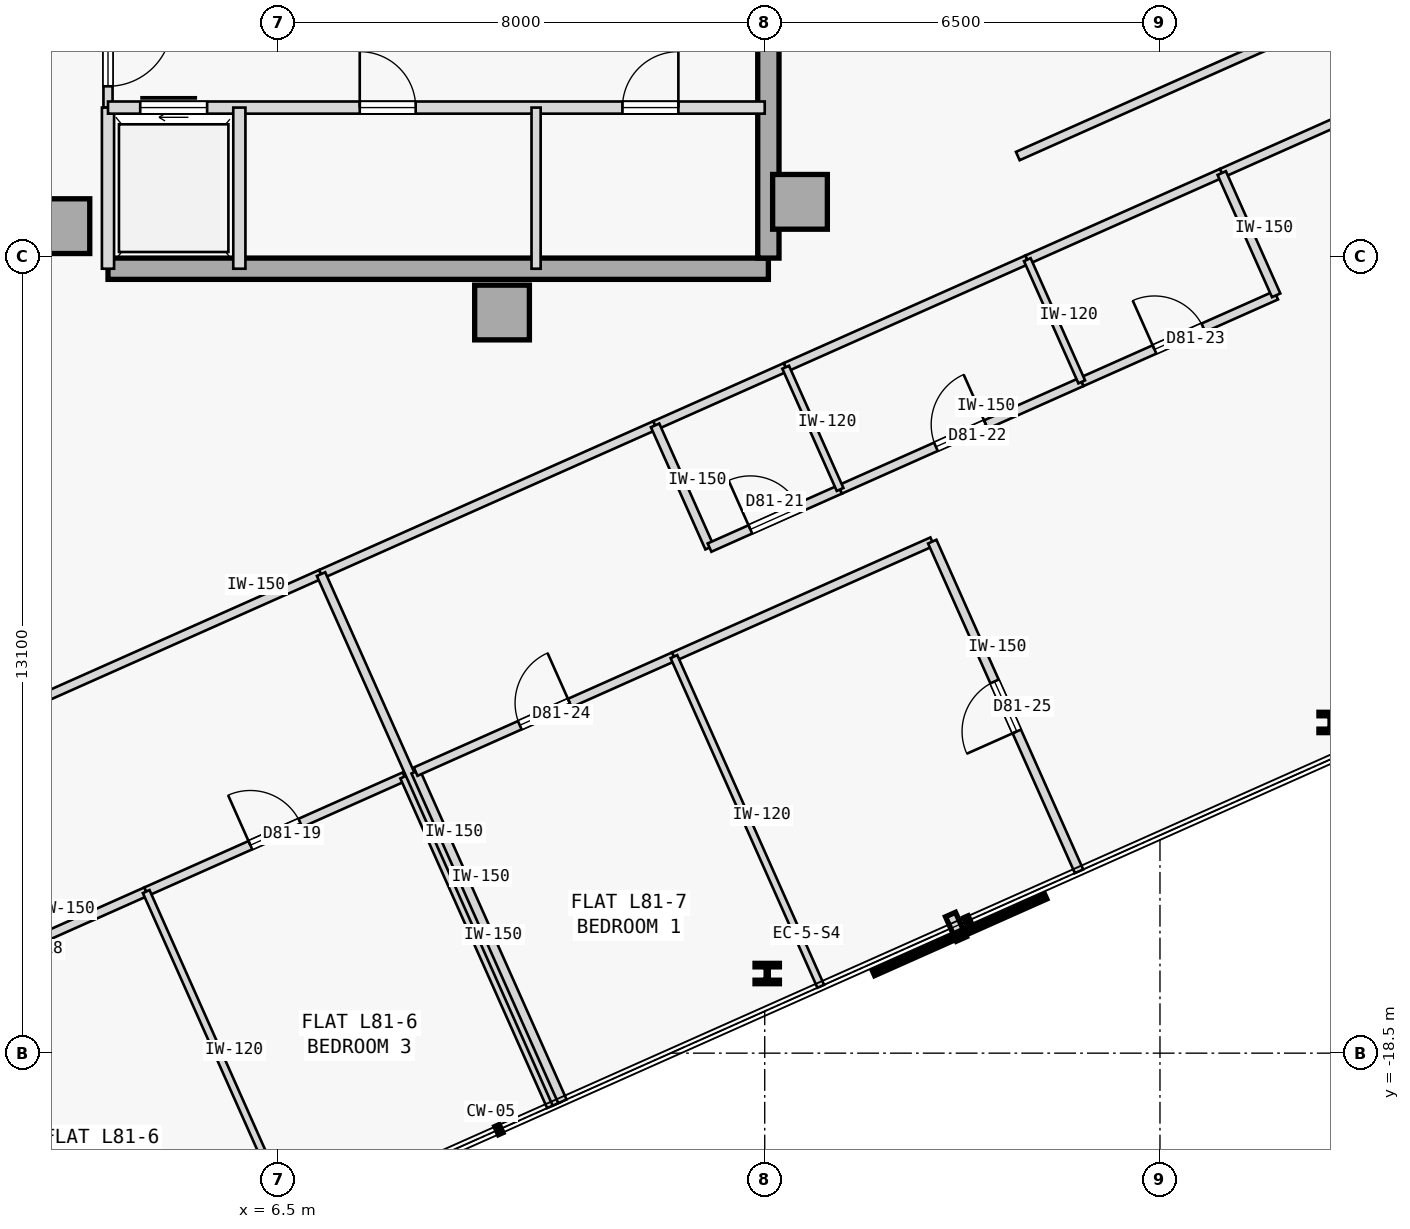
"""IFC4 building model, lengths in metres.
Left out: names, types, materials, properties, quantities, classifications, styles, units other than length and angle.
Written with IfcOpenShell. Run it as: python <this file> out.ifc"""

import sys

from ifc_helpers import new_model, si_unit, direction, frame, frame_2d, origin, origin_2d, place, context, subcontext, project, spatial, rectangle, i_section, extrude, element, fill, save


model = new_model("IFC4")
c1 = context("Model", 3, precision=1e-05, world=origin(), true_north=direction((0.0, 1.0)))
c2 = subcontext(c1, "Body", "Model", "MODEL_VIEW")
j1 = project(units=[si_unit("LENGTHUNIT", "METRE"), si_unit("PLANEANGLEUNIT", "RADIAN")], contexts=[c1])
p1 = place(None, origin())
s1 = spatial("IfcSite", under=j1, at=p1, CompositionType="ELEMENT")
p2 = place(p1, origin())
s2 = spatial("IfcBuilding", under=s1, at=p2, CompositionType="ELEMENT")
p3 = place(p2, frame((0.0, 0.0, 302.0)))
s3 = spatial("IfcBuildingStorey", under=s2, at=p3, CompositionType="ELEMENT", Elevation=302.0)
for number, where, z_axis, x_axis in (
    (1, (15.08, -4.5, 0.0), (0.0, 0.0, 1.0), (1.0, 0.0, 0.0)),
    (2, (10.18, -6.32, 0.0), (0.0, 0.0, 1.0), (1.0, 0.0, 0.0)),
    (3, (2.95, -4.9, 0.0), (0.0, 0.0, 1.0), (1.0, 0.0, 0.0)),
):
    element("IfcColumn", number, at=place(p3, frame(where, z_axis=z_axis, x_axis=x_axis)), inside=s3, PredefinedType="COLUMN", context=c2, shape_type="SweptSolid", body=[
        extrude(rectangle(XDim=0.9, YDim=0.9, at=origin_2d()), origin(), (0.0, 0.0, 1.0), 3.55),
    ])
p4 = place(p3, frame((3.7, -5.6, 0.0), z_axis=(0.0, 0.0, 1.0), x_axis=(1.0, 0.0, 0.0)))
e4 = element("IfcWall", 4, at=p4, inside=s3, PredefinedType="SHEAR", context=c2, shape_type="SweptSolid", body=[
    extrude(rectangle(XDim=10.86, YDim=0.35, at=frame_2d((5.43, 0.0))), origin(), (0.0, 0.0, 1.0), 3.145),
])
p5 = place(p3, frame((14.56, -5.425, 0.0), z_axis=(0.0, 0.0, 1.0), x_axis=(0.0, 1.0, 0.0)))
e5 = element("IfcWall", 5, at=p5, inside=s3, PredefinedType="SHEAR", context=c2, shape_type="SweptSolid", body=[
    extrude(rectangle(XDim=10.85, YDim=0.35, at=frame_2d((5.425, 0.0))), origin(), (0.0, 0.0, 1.0), 3.145),
])
for number, where, z_axis, x_axis in (
    (6, (14.541, -17.19, 0.0), (0.0, 0.0, 1.0), (1.0, 0.0, 0.0)),
    (7, (23.814, -13.062, 0.0), (0.0, 0.0, 1.0), (1.0, 0.0, 0.0)),
):
    element("IfcColumn", number, at=place(p3, frame(where, z_axis=z_axis, x_axis=x_axis)), inside=s3, PredefinedType="COLUMN", context=c2, shape_type="SweptSolid", body=[
        extrude(i_section(OverallWidth=0.401, OverallDepth=0.335, WebThickness=0.036, FlangeThickness=0.058, FilletRadius=0.015, at=origin_2d()), origin(), (0.0, 0.0, 1.0), 3.55),
    ])
p6 = place(p3, frame((3.7, -2.95, 0.0), z_axis=(0.0, 0.0, 1.0), x_axis=(0.0, 1.0, 0.0)))
e8 = element("IfcWall", 8, at=p6, inside=s3, PredefinedType="PARTITIONING", context=c2, shape_type="SweptSolid", body=[
    extrude(rectangle(XDim=1.8, YDim=0.15, at=frame_2d((0.9, 0.0))), origin(), (0.0, 0.0, 1.0), 3.145),
])
p7 = place(p6, frame((0.35, 0.0, 0.0)))
e9 = element("IfcOpeningElement", 9, at=p7, cuts=e8, PredefinedType="OPENING", context=c2, shape_type="SweptSolid", body=[
    extrude(rectangle(XDim=1.05, YDim=2.18, at=frame_2d((0.525, 1.09))), frame((0.0, 0.085, 0.0), z_axis=(0.0, -1.0, 0.0), x_axis=(1.0, 0.0, 0.0)), (0.0, 0.0, 1.0), 0.17),
])
p8 = place(p3, frame((3.7, -5.6, 0.0), z_axis=(0.0, 0.0, 1.0), x_axis=(0.0, 1.0, 0.0)))
e10 = element("IfcWall", 10, at=p8, inside=s3, PredefinedType="STANDARD", context=c2, shape_type="SweptSolid", body=[
    extrude(rectangle(XDim=2.65, YDim=0.2, at=frame_2d((1.325, 0.0))), origin(), (0.0, 0.0, 1.0), 3.145),
])
p9 = place(p3, frame((3.7, -2.95, 0.0), z_axis=(0.0, 0.0, 1.0), x_axis=(1.0, 0.0, 0.0)))
e11 = element("IfcWall", 11, at=p9, inside=s3, PredefinedType="STANDARD", context=c2, shape_type="SweptSolid", body=[
    extrude(rectangle(XDim=10.8, YDim=0.2, at=frame_2d((5.4, 0.0))), origin(), (0.0, 0.0, 1.0), 3.145),
])
p10 = place(p9, frame((0.53, 0.0, 0.0)))
e12 = element("IfcOpeningElement", 12, at=p10, cuts=e11, PredefinedType="OPENING", context=c2, shape_type="SweptSolid", body=[
    extrude(rectangle(XDim=1.1, YDim=2.15, at=frame_2d((0.55, 1.075))), frame((0.0, 0.11, 0.0), z_axis=(0.0, -1.0, 0.0), x_axis=(1.0, 0.0, 0.0)), (0.0, 0.0, 1.0), 0.22),
])
p11 = place(p9, frame((4.14, 0.0, 0.0)))
e13 = element("IfcOpeningElement", 13, at=p11, cuts=e11, PredefinedType="OPENING", context=c2, shape_type="SweptSolid", body=[
    extrude(rectangle(XDim=0.92, YDim=2.04, at=frame_2d((0.46, 1.02))), frame((0.0, 0.11, 0.0), z_axis=(0.0, -1.0, 0.0), x_axis=(1.0, 0.0, 0.0)), (0.0, 0.0, 1.0), 0.22),
])
p12 = place(p9, frame((8.46, 0.0, 0.0)))
e14 = element("IfcOpeningElement", 14, at=p12, cuts=e11, PredefinedType="OPENING", context=c2, shape_type="SweptSolid", body=[
    extrude(rectangle(XDim=0.92, YDim=2.04, at=frame_2d((0.46, 1.02))), frame((0.0, 0.11, 0.0), z_axis=(0.0, -1.0, 0.0), x_axis=(1.0, 0.0, 0.0)), (0.0, 0.0, 1.0), 0.22),
])
p13 = place(p3, frame((5.86, -5.6, 0.0), z_axis=(0.0, 0.0, 1.0), x_axis=(0.0, 1.0, 0.0)))
e15 = element("IfcWall", 15, at=p13, inside=s3, PredefinedType="STANDARD", context=c2, shape_type="SweptSolid", body=[
    extrude(rectangle(XDim=2.65, YDim=0.2, at=frame_2d((1.325, 0.0))), origin(), (0.0, 0.0, 1.0), 3.145),
])
p14 = place(p3, frame((10.74, -5.6, 0.0), z_axis=(0.0, 0.0, 1.0), x_axis=(0.0, 1.0, 0.0)))
e16 = element("IfcWall", 16, at=p14, inside=s3, PredefinedType="PARTITIONING", context=c2, shape_type="SweptSolid", body=[
    extrude(rectangle(XDim=2.65, YDim=0.15, at=frame_2d((1.325, 0.0))), origin(), (0.0, 0.0, 1.0), 3.145),
])
p15 = place(p3, frame((-4.445, -15.808, 0.0), z_axis=(0.0, 0.0, 1.0), x_axis=(0.913546853922, 0.406733506966, 0.0)))
e17 = element("IfcWall", 17, at=p15, inside=s3, PredefinedType="PARTITIONING", context=c2, shape_type="SweptSolid", body=[
    extrude(rectangle(XDim=12.751, YDim=0.15, at=frame_2d((6.375, 0.0))), origin(), (0.0, 0.0, 1.0), 3.145),
])
p16 = place(p3, frame((7.204, -10.622, 0.0), z_axis=(0.0, 0.0, 1.0), x_axis=(0.913545172627, 0.406737283231, 0.0)))
e18 = element("IfcWall", 18, at=p16, inside=s3, PredefinedType="PARTITIONING", context=c2, shape_type="SweptSolid", body=[
    extrude(rectangle(XDim=6.014, YDim=0.15, at=frame_2d((3.007, 0.0))), origin(), (0.0, 0.0, 1.0), 3.145),
])
p17 = place(p3, frame((22.016, -4.027, 0.0), z_axis=(0.0, 0.0, 1.0), x_axis=(0.913548968583, 0.406728757282, 0.0)))
e19 = element("IfcWall", 19, at=p17, inside=s3, PredefinedType="PARTITIONING", context=c2, shape_type="SweptSolid", body=[
    extrude(rectangle(XDim=11.242, YDim=0.15, at=frame_2d((5.621, 0.0))), origin(), (0.0, 0.0, 1.0), 3.145),
])
p18 = place(p17, frame((5.146, 0.0, 0.0)))
e20 = element("IfcOpeningElement", 20, at=p18, cuts=e19, PredefinedType="OPENING", context=c2, shape_type="SweptSolid", body=[
    extrude(rectangle(XDim=0.95, YDim=2.04, at=frame_2d((0.475, 1.02))), frame((0.0, 0.085, 0.0), z_axis=(0.0, -1.0, 0.0), x_axis=(1.0, 0.0, 0.0)), (0.0, 0.0, 1.0), 0.17),
])
p19 = place(p3, frame((12.698, -8.176, 0.0), z_axis=(0.0, 0.0, 1.0), x_axis=(0.913558622212, 0.406707073682, 0.0)))
e21 = element("IfcWall", 21, at=p19, inside=s3, PredefinedType="PARTITIONING", context=c2, shape_type="SweptSolid", body=[
    extrude(rectangle(XDim=2.35, YDim=0.15, at=frame_2d((1.175, 0.0))), origin(), (0.0, 0.0, 1.0), 3.145),
])
p20 = place(p3, frame((14.844, -7.22, 0.0), z_axis=(0.0, 0.0, 1.0), x_axis=(0.913524337797, 0.406784075711, 0.0)))
e22 = element("IfcWall", 22, at=p20, inside=s3, PredefinedType="PARTITIONING", context=c2, shape_type="SweptSolid", body=[
    extrude(rectangle(XDim=4.35, YDim=0.15, at=frame_2d((2.175, 0.0))), origin(), (0.0, 0.0, 1.0), 3.145),
])
p21 = place(p3, frame((18.818, -5.451, 0.0), z_axis=(0.0, 0.0, 1.0), x_axis=(0.913538066796, 0.406753242783, 0.0)))
e23 = element("IfcWall", 23, at=p21, inside=s3, PredefinedType="PARTITIONING", context=c2, shape_type="SweptSolid", body=[
    extrude(rectangle(XDim=3.5, YDim=0.15, at=frame_2d((1.75, 0.0))), origin(), (0.0, 0.0, 1.0), 3.145),
])
p22 = place(p3, frame((18.662, -3.747, 0.0), z_axis=(0.0, 0.0, 1.0), x_axis=(0.913544622417, 0.406738519018, 0.0)))
e24 = element("IfcWall", 24, at=p22, inside=s3, PredefinedType="PARTITIONING", context=c2, shape_type="SweptSolid", body=[
    extrude(rectangle(XDim=14.192, YDim=0.15, at=frame_2d((7.096, 0.0))), origin(), (0.0, 0.0, 1.0), 3.145),
])
p23 = place(p22, frame((6.636, 0.0, 0.0)))
e25 = element("IfcOpeningElement", 25, at=p23, cuts=e24, PredefinedType="OPENING", context=c2, shape_type="SweptSolid", body=[
    extrude(rectangle(XDim=0.92, YDim=2.04, at=frame_2d((0.46, 1.02))), frame((0.0, 0.085, 0.0), z_axis=(0.0, -1.0, 0.0), x_axis=(1.0, 0.0, 0.0)), (0.0, 0.0, 1.0), 0.17),
])
p24 = place(p3, frame((0.08, -17.734, 0.0), z_axis=(0.0, 0.0, 1.0), x_axis=(0.91354505039, 0.40673755778, 0.0)))
e26 = element("IfcWall", 26, at=p24, inside=s3, PredefinedType="PARTITIONING", context=c2, shape_type="SweptSolid", body=[
    extrude(rectangle(XDim=4.65, YDim=0.15, at=frame_2d((2.325, 0.0))), origin(), (0.0, 0.0, 1.0), 3.145),
])
p25 = place(p24, frame((1.875, 0.0, 0.0)))
e27 = element("IfcOpeningElement", 27, at=p25, cuts=e26, PredefinedType="OPENING", context=c2, shape_type="SweptSolid", body=[
    extrude(rectangle(XDim=0.9, YDim=2.04, at=frame_2d((0.45, 1.02))), frame((0.0, 0.085, 0.0), z_axis=(0.0, -1.0, 0.0), x_axis=(1.0, 0.0, 0.0)), (0.0, 0.0, 1.0), 0.17),
])
p26 = place(p3, frame((4.328, -15.843, 0.0), z_axis=(0.0, 0.0, 1.0), x_axis=(0.91354505039, 0.40673755778, 0.0)))
e28 = element("IfcWall", 28, at=p26, inside=s3, PredefinedType="PARTITIONING", context=c2, shape_type="SweptSolid", body=[
    extrude(rectangle(XDim=4.65, YDim=0.15, at=frame_2d((2.325, 0.0))), origin(), (0.0, 0.0, 1.0), 3.145),
])
p27 = place(p26, frame((1.875, 0.0, 0.0)))
e29 = element("IfcOpeningElement", 29, at=p27, cuts=e28, PredefinedType="OPENING", context=c2, shape_type="SweptSolid", body=[
    extrude(rectangle(XDim=0.9, YDim=2.04, at=frame_2d((0.45, 1.02))), frame((0.0, 0.085, 0.0), z_axis=(0.0, -1.0, 0.0), x_axis=(1.0, 0.0, 0.0)), (0.0, 0.0, 1.0), 0.17),
])
p28 = place(p3, frame((10.99, -19.373, 0.0), z_axis=(0.0, 0.0, 1.0), x_axis=(-0.406749048544, 0.913539934271, 0.0)))
e30 = element("IfcWall", 30, at=p28, inside=s3, PredefinedType="PARTITIONING", context=c2, shape_type="SweptSolid", body=[
    extrude(rectangle(XDim=5.935, YDim=0.15, at=frame_2d((2.968, 0.0))), origin(), (0.0, 0.0, 1.0), 3.145),
])
p29 = place(p3, frame((11.082, -19.333, 0.0), z_axis=(0.0, 0.0, 1.0), x_axis=(-0.406729927653, 0.913548447512, 0.0)))
e31 = element("IfcWall", 31, at=p29, inside=s3, PredefinedType="PARTITIONING", context=c2, shape_type="SweptSolid", body=[
    extrude(rectangle(XDim=9.535, YDim=0.15, at=frame_2d((4.768, 0.0))), origin(), (0.0, 0.0, 1.0), 3.145),
])
p30 = place(p3, frame((6.742, -21.265, 0.0), z_axis=(0.0, 0.0, 1.0), x_axis=(-0.406749048544, 0.913539934271, 0.0)))
e32 = element("IfcWall", 32, at=p30, inside=s3, PredefinedType="PARTITIONING", context=c2, shape_type="SweptSolid", body=[
    extrude(rectangle(XDim=5.935, YDim=0.12, at=frame_2d((2.968, 0.0))), origin(), (0.0, 0.0, 1.0), 3.145),
])
p31 = place(p3, frame((13.592, -10.186, 0.0), z_axis=(0.0, 0.0, 1.0), x_axis=(-0.406725294076, 0.913550510459, 0.0)))
e33 = element("IfcWall", 33, at=p31, inside=s3, PredefinedType="PARTITIONING", context=c2, shape_type="SweptSolid", body=[
    extrude(rectangle(XDim=2.2, YDim=0.15, at=frame_2d((1.1, 0.0))), origin(), (0.0, 0.0, 1.0), 3.145),
])
p32 = place(p3, frame((13.592, -10.186, 0.0), z_axis=(0.0, 0.0, 1.0), x_axis=(0.913558622212, 0.406707073682, 0.0)))
e34 = element("IfcWall", 34, at=p32, inside=s3, PredefinedType="PARTITIONING", context=c2, shape_type="SweptSolid", body=[
    extrude(rectangle(XDim=2.35, YDim=0.15, at=frame_2d((1.175, 0.0))), origin(), (0.0, 0.0, 1.0), 3.145),
])
p33 = place(p32, frame((0.735, 0.0, 0.0)))
e35 = element("IfcOpeningElement", 35, at=p33, cuts=e34, PredefinedType="OPENING", context=c2, shape_type="SweptSolid", body=[
    extrude(rectangle(XDim=0.88, YDim=2.04, at=frame_2d((0.44, 1.02))), frame((0.0, 0.085, 0.0), z_axis=(0.0, -1.0, 0.0), x_axis=(1.0, 0.0, 0.0)), (0.0, 0.0, 1.0), 0.17),
])
p34 = place(p3, frame((15.739, -9.23, 0.0), z_axis=(0.0, 0.0, 1.0), x_axis=(0.913545193015, 0.406737237438, 0.0)))
e36 = element("IfcWall", 36, at=p34, inside=s3, PredefinedType="PARTITIONING", context=c2, shape_type="SweptSolid", body=[
    extrude(rectangle(XDim=4.35, YDim=0.15, at=frame_2d((2.175, 0.0))), origin(), (0.0, 0.0, 1.0), 3.145),
])
p35 = place(p34, frame((1.725, 0.0, 0.0)))
e37 = element("IfcOpeningElement", 37, at=p35, cuts=e36, PredefinedType="OPENING", context=c2, shape_type="SweptSolid", body=[
    extrude(rectangle(XDim=0.9, YDim=2.04, at=frame_2d((0.45, 1.02))), frame((0.0, 0.085, 0.0), z_axis=(0.0, -1.0, 0.0), x_axis=(1.0, 0.0, 0.0)), (0.0, 0.0, 1.0), 0.17),
])
p36 = place(p3, frame((19.713, -7.461, 0.0), z_axis=(0.0, 0.0, 1.0), x_axis=(0.913549606868, 0.406727323635, 0.0)))
e38 = element("IfcWall", 38, at=p36, inside=s3, PredefinedType="PARTITIONING", context=c2, shape_type="SweptSolid", body=[
    extrude(rectangle(XDim=3.5, YDim=0.15, at=frame_2d((1.75, 0.0))), origin(), (0.0, 0.0, 1.0), 3.145),
])
p37 = place(p36, frame((1.31, 0.0, 0.0)))
e39 = element("IfcOpeningElement", 39, at=p37, cuts=e38, PredefinedType="OPENING", context=c2, shape_type="SweptSolid", body=[
    extrude(rectangle(XDim=0.88, YDim=2.04, at=frame_2d((0.44, 1.02))), frame((0.0, 0.085, 0.0), z_axis=(0.0, -1.0, 0.0), x_axis=(1.0, 0.0, 0.0)), (0.0, 0.0, 1.0), 0.17),
])
p38 = place(p3, frame((22.911, -6.037, 0.0), z_axis=(0.0, 0.0, 1.0), x_axis=(-0.40677666873, 0.913527636022, 0.0)))
e40 = element("IfcWall", 40, at=p38, inside=s3, PredefinedType="PARTITIONING", context=c2, shape_type="SweptSolid", body=[
    extrude(rectangle(XDim=2.2, YDim=0.15, at=frame_2d((1.1, 0.0))), origin(), (0.0, 0.0, 1.0), 3.145),
])
p39 = place(p3, frame((11.173, -19.292, 0.0), z_axis=(0.0, 0.0, 1.0), x_axis=(-0.406749048544, 0.913539934271, 0.0)))
e41 = element("IfcWall", 41, at=p39, inside=s3, PredefinedType="PARTITIONING", context=c2, shape_type="SweptSolid", body=[
    extrude(rectangle(XDim=5.935, YDim=0.15, at=frame_2d((2.968, 0.0))), origin(), (0.0, 0.0, 1.0), 3.145),
])
p40 = place(p3, frame((8.759, -13.87, 0.0), z_axis=(0.0, 0.0, 1.0), x_axis=(0.91354505039, 0.40673755778, 0.0)))
e42 = element("IfcWall", 42, at=p40, inside=s3, PredefinedType="PARTITIONING", context=c2, shape_type="SweptSolid", body=[
    extrude(rectangle(XDim=4.65, YDim=0.15, at=frame_2d((2.325, 0.0))), origin(), (0.0, 0.0, 1.0), 3.145),
])
p41 = place(p40, frame((1.875, 0.0, 0.0)))
e43 = element("IfcOpeningElement", 43, at=p41, cuts=e42, PredefinedType="OPENING", context=c2, shape_type="SweptSolid", body=[
    extrude(rectangle(XDim=0.9, YDim=2.04, at=frame_2d((0.45, 1.02))), frame((0.0, 0.085, 0.0), z_axis=(0.0, -1.0, 0.0), x_axis=(1.0, 0.0, 0.0)), (0.0, 0.0, 1.0), 0.17),
])
p42 = place(p3, frame((13.007, -11.979, 0.0), z_axis=(0.0, 0.0, 1.0), x_axis=(0.91354505039, 0.40673755778, 0.0)))
e44 = element("IfcWall", 44, at=p42, inside=s3, PredefinedType="PARTITIONING", context=c2, shape_type="SweptSolid", body=[
    extrude(rectangle(XDim=4.65, YDim=0.15, at=frame_2d((2.325, 0.0))), origin(), (0.0, 0.0, 1.0), 3.145),
])
p43 = place(p3, frame((19.669, -15.51, 0.0), z_axis=(0.0, 0.0, 1.0), x_axis=(-0.406733763825, 0.913546739562, 0.0)))
e45 = element("IfcWall", 45, at=p43, inside=s3, PredefinedType="PARTITIONING", context=c2, shape_type="SweptSolid", body=[
    extrude(rectangle(XDim=5.935, YDim=0.15, at=frame_2d((2.968, 0.0))), origin(), (0.0, 0.0, 1.0), 3.145),
])
p44 = place(p43, frame((2.518, 0.0, 0.0)))
e46 = element("IfcOpeningElement", 46, at=p44, cuts=e45, PredefinedType="OPENING", context=c2, shape_type="SweptSolid", body=[
    extrude(rectangle(XDim=0.9, YDim=2.04, at=frame_2d((0.45, 1.02))), frame((0.0, 0.085, 0.0), z_axis=(0.0, -1.0, 0.0), x_axis=(1.0, 0.0, 0.0)), (0.0, 0.0, 1.0), 0.17),
])
p45 = place(p3, frame((15.739, -9.23, 0.0), z_axis=(0.0, 0.0, 1.0), x_axis=(-0.406725294076, 0.913550510459, 0.0)))
e47 = element("IfcWall", 47, at=p45, inside=s3, PredefinedType="PARTITIONING", context=c2, shape_type="SweptSolid", body=[
    extrude(rectangle(XDim=2.2, YDim=0.12, at=frame_2d((1.1, 0.0))), origin(), (0.0, 0.0, 1.0), 3.145),
])
p46 = place(p3, frame((19.713, -7.461, 0.0), z_axis=(0.0, 0.0, 1.0), x_axis=(-0.406684063321, 0.913568865845, 0.0)))
e48 = element("IfcWall", 48, at=p46, inside=s3, PredefinedType="PARTITIONING", context=c2, shape_type="SweptSolid", body=[
    extrude(rectangle(XDim=2.2, YDim=0.12, at=frame_2d((1.1, 0.0))), origin(), (0.0, 0.0, 1.0), 3.145),
])
p47 = place(p3, frame((15.421, -17.401, 0.0), z_axis=(0.0, 0.0, 1.0), x_axis=(-0.406749048544, 0.913539934271, 0.0)))
e49 = element("IfcWall", 49, at=p47, inside=s3, PredefinedType="PARTITIONING", context=c2, shape_type="SweptSolid", body=[
    extrude(rectangle(XDim=5.935, YDim=0.12, at=frame_2d((2.968, 0.0))), origin(), (0.0, 0.0, 1.0), 3.145),
])
p48 = place(p7, frame((1.05, 0.0, 0.0), z_axis=(0.0, 0.0, 1.0), x_axis=(-1.0, 0.0, 0.0)))
e50 = element("IfcDoor", 50, at=p48, inside=s3, OperationType="SINGLE_SWING_RIGHT", PredefinedType="DOOR", context=c2, shape_type="SweptSolid", body=[
    extrude(rectangle(XDim=1.05, YDim=2.18, at=frame_2d((0.525, 1.09))), frame((0.0, 0.025, 0.0), z_axis=(0.0, -1.0, 0.0), x_axis=(1.0, 0.0, 0.0)), (0.0, 0.0, 1.0), 0.05),
])
fill(e9, e50)
p49 = place(p10, origin())
e51 = element("IfcDoor", 51, at=p49, inside=s3, OperationType="SLIDING_TO_RIGHT", PredefinedType="DOOR", context=c2, shape_type="SweptSolid", body=[
    extrude(rectangle(XDim=1.1, YDim=2.15, at=frame_2d((0.55, 1.075))), frame((0.0, 0.025, 0.0), z_axis=(0.0, -1.0, 0.0), x_axis=(1.0, 0.0, 0.0)), (0.0, 0.0, 1.0), 0.05),
])
fill(e12, e51)
p50 = place(p11, origin())
e52 = element("IfcDoor", 52, at=p50, inside=s3, OperationType="SINGLE_SWING_LEFT", PredefinedType="DOOR", context=c2, shape_type="SweptSolid", body=[
    extrude(rectangle(XDim=0.92, YDim=2.04, at=frame_2d((0.46, 1.02))), frame((0.0, 0.025, 0.0), z_axis=(0.0, -1.0, 0.0), x_axis=(1.0, 0.0, 0.0)), (0.0, 0.0, 1.0), 0.05),
])
fill(e13, e52)
p51 = place(p12, origin())
e53 = element("IfcDoor", 53, at=p51, inside=s3, OperationType="SINGLE_SWING_RIGHT", PredefinedType="DOOR", context=c2, shape_type="SweptSolid", body=[
    extrude(rectangle(XDim=0.92, YDim=2.04, at=frame_2d((0.46, 1.02))), frame((0.0, 0.025, 0.0), z_axis=(0.0, -1.0, 0.0), x_axis=(1.0, 0.0, 0.0)), (0.0, 0.0, 1.0), 0.05),
])
fill(e14, e53)
p52 = place(p27, origin())
e54 = element("IfcDoor", 54, at=p52, inside=s3, OperationType="SINGLE_SWING_LEFT", PredefinedType="DOOR", context=c2, shape_type="SweptSolid", body=[
    extrude(rectangle(XDim=0.9, YDim=2.04, at=frame_2d((0.45, 1.02))), frame((0.0, 0.025, 0.0), z_axis=(0.0, -1.0, 0.0), x_axis=(1.0, 0.0, 0.0)), (0.0, 0.0, 1.0), 0.05),
])
fill(e29, e54)
p53 = place(p33, origin())
e55 = element("IfcDoor", 55, at=p53, inside=s3, OperationType="SINGLE_SWING_LEFT", PredefinedType="DOOR", context=c2, shape_type="SweptSolid", body=[
    extrude(rectangle(XDim=0.88, YDim=2.04, at=frame_2d((0.44, 1.02))), frame((0.0, 0.025, 0.0), z_axis=(0.0, -1.0, 0.0), x_axis=(1.0, 0.0, 0.0)), (0.0, 0.0, 1.0), 0.05),
])
fill(e35, e55)
p54 = place(p35, origin())
e56 = element("IfcDoor", 56, at=p54, inside=s3, OperationType="SINGLE_SWING_RIGHT", PredefinedType="DOOR", context=c2, shape_type="SweptSolid", body=[
    extrude(rectangle(XDim=0.9, YDim=2.04, at=frame_2d((0.45, 1.02))), frame((0.0, 0.025, 0.0), z_axis=(0.0, -1.0, 0.0), x_axis=(1.0, 0.0, 0.0)), (0.0, 0.0, 1.0), 0.05),
])
fill(e37, e56)
p55 = place(p37, origin())
e57 = element("IfcDoor", 57, at=p55, inside=s3, OperationType="SINGLE_SWING_LEFT", PredefinedType="DOOR", context=c2, shape_type="SweptSolid", body=[
    extrude(rectangle(XDim=0.88, YDim=2.04, at=frame_2d((0.44, 1.02))), frame((0.0, 0.025, 0.0), z_axis=(0.0, -1.0, 0.0), x_axis=(1.0, 0.0, 0.0)), (0.0, 0.0, 1.0), 0.05),
])
fill(e39, e57)
p56 = place(p41, origin())
e58 = element("IfcDoor", 58, at=p56, inside=s3, OperationType="SINGLE_SWING_RIGHT", PredefinedType="DOOR", context=c2, shape_type="SweptSolid", body=[
    extrude(rectangle(XDim=0.9, YDim=2.04, at=frame_2d((0.45, 1.02))), frame((0.0, 0.025, 0.0), z_axis=(0.0, -1.0, 0.0), x_axis=(1.0, 0.0, 0.0)), (0.0, 0.0, 1.0), 0.05),
])
fill(e43, e58)
p57 = place(p44, origin())
e59 = element("IfcDoor", 59, at=p57, inside=s3, OperationType="SINGLE_SWING_LEFT", PredefinedType="DOOR", context=c2, shape_type="SweptSolid", body=[
    extrude(rectangle(XDim=0.9, YDim=2.04, at=frame_2d((0.45, 1.02))), frame((0.0, 0.025, 0.0), z_axis=(0.0, -1.0, 0.0), x_axis=(1.0, 0.0, 0.0)), (0.0, 0.0, 1.0), 0.05),
])
fill(e46, e59)
save(model, sys.argv[1])
